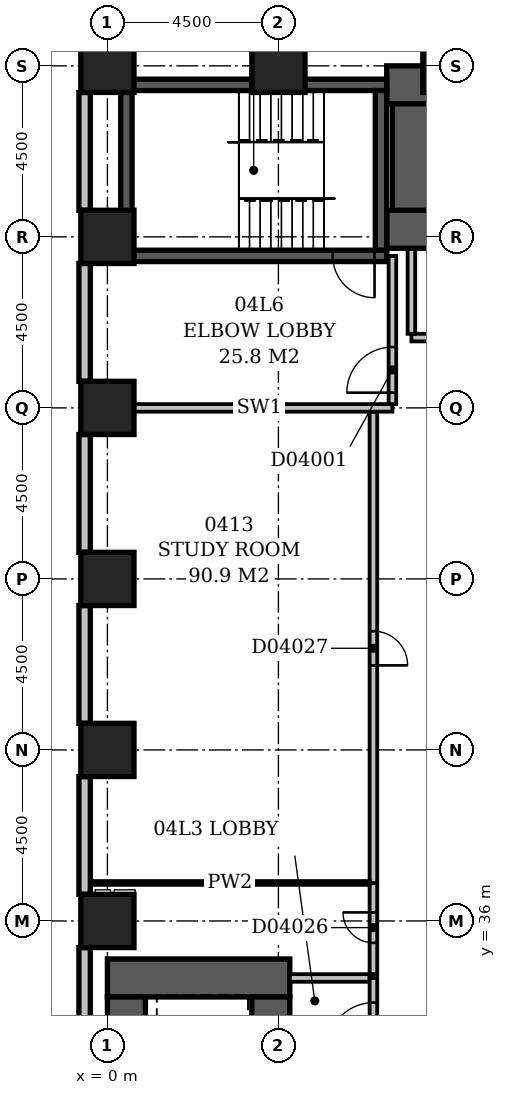
"""IFC4 building model, lengths in metres.
Left out: names, types, materials, properties, quantities, classifications, styles, units other than length and angle.
Written with IfcOpenShell. Run it as: python <this file> out.ifc"""

import sys

from ifc_helpers import new_model, si_unit, direction, frame, frame_2d, origin, origin_2d, place, context, subcontext, project, spatial, rectangle, extrude, element, fill, save


model = new_model("IFC4")
c1 = context("Model", 3, precision=1e-05, world=origin(), true_north=direction((0.0, 1.0)))
c2 = subcontext(c1, "Body", "Model", "MODEL_VIEW")
j1 = project(units=[si_unit("LENGTHUNIT", "METRE"), si_unit("PLANEANGLEUNIT", "RADIAN")], contexts=[c1])
p1 = place(None, origin())
s1 = spatial("IfcSite", under=j1, at=p1, CompositionType="ELEMENT")
p2 = place(p1, origin())
s2 = spatial("IfcBuilding", under=s1, at=p2, CompositionType="ELEMENT")
p3 = place(p2, frame((0.0, 0.0, 24.0)))
s3 = spatial("IfcBuildingStorey", under=s2, at=p3, CompositionType="ELEMENT", Elevation=24.0)
p4 = place(p3, frame((0.0, 34.5, -0.45), z_axis=(0.0, 0.0, 1.0), x_axis=(1.0, 0.0, 0.0)))
e1 = element("IfcWall", 1, at=p4, inside=s3, PredefinedType="SHEAR", context=c2, shape_type="SweptSolid", body=[
    extrude(rectangle(XDim=4.8, YDim=1.0, at=frame_2d((2.4, 0.0))), origin(), (0.0, 0.0, 1.0), 5.15),
])
p5 = place(p3, frame((0.35, 53.5, -0.45), z_axis=(0.0, 0.0, 1.0), x_axis=(1.0, 0.0, 0.0)))
e2 = element("IfcWall", 2, at=p5, inside=s3, PredefinedType="SHEAR", context=c2, shape_type="SweptSolid", body=[
    extrude(rectangle(XDim=7.0, YDim=0.3, at=frame_2d((3.5, 0.0))), origin(), (0.0, 0.0, 1.0), 5.15),
])
p6 = place(p5, frame((5.58, 0.0, 0.45)))
e3 = element("IfcOpeningElement", 3, at=p6, cuts=e2, PredefinedType="OPENING", context=c2, shape_type="SweptSolid", body=[
    extrude(rectangle(XDim=1.1, YDim=2.1, at=frame_2d((0.55, 1.05))), frame((0.0, 0.162, 0.0), z_axis=(0.0, -1.0, 0.0), x_axis=(1.0, 0.0, 0.0)), (0.0, 0.0, 1.0), 0.324),
])
p7 = place(p3, frame((0.35, 58.0, -0.45), z_axis=(0.0, 0.0, 1.0), x_axis=(1.0, 0.0, 0.0)))
e4 = element("IfcWall", 4, at=p7, inside=s3, PredefinedType="SHEAR", context=c2, shape_type="SweptSolid", body=[
    extrude(rectangle(XDim=7.0, YDim=0.3, at=frame_2d((3.5, 0.0))), origin(), (0.0, 0.0, 1.0), 5.15),
])
p8 = place(p3, frame((0.5, 27.15, -0.45), z_axis=(0.0, 0.0, 1.0), x_axis=(0.0, 1.0, 0.0)))
e5 = element("IfcWall", 5, at=p8, inside=s3, PredefinedType="SHEAR", context=c2, shape_type="SweptSolid", body=[
    extrude(rectangle(XDim=6.85, YDim=1.0, at=frame_2d((3.425, 0.0))), origin(), (0.0, 0.0, 1.0), 5.15),
])
p9 = place(p3, frame((0.5, 53.65, -0.45), z_axis=(0.0, 0.0, 1.0), x_axis=(0.0, 1.0, 0.0)))
e6 = element("IfcWall", 6, at=p9, inside=s3, PredefinedType="SHEAR", context=c2, shape_type="SweptSolid", body=[
    extrude(rectangle(XDim=4.2, YDim=0.3, at=frame_2d((2.1, 0.0))), origin(), (0.0, 0.0, 1.0), 5.15),
])
p10 = place(p3, frame((4.3, 27.15, -0.45), z_axis=(0.0, 0.0, 1.0), x_axis=(0.0, 1.0, 0.0)))
e7 = element("IfcWall", 7, at=p10, inside=s3, PredefinedType="SHEAR", context=c2, shape_type="SweptSolid", body=[
    extrude(rectangle(XDim=6.85, YDim=1.0, at=frame_2d((3.425, 0.0))), origin(), (0.0, 0.0, 1.0), 5.15),
])
p11 = place(p10, frame((3.05, 0.0, 0.45)))
e8 = element("IfcOpeningElement", 8, at=p11, cuts=e7, PredefinedType="OPENING", context=c2, shape_type="SweptSolid", body=[
    extrude(rectangle(XDim=1.1, YDim=2.1, at=frame_2d((0.55, 1.05))), frame((0.0, 0.512, 0.0), z_axis=(0.0, -1.0, 0.0), x_axis=(1.0, 0.0, 0.0)), (0.0, 0.0, 1.0), 1.024),
])
p12 = place(p10, frame((0.6, 0.0, 0.45)))
e9 = element("IfcOpeningElement", 9, at=p12, cuts=e7, PredefinedType="OPENING", context=c2, shape_type="SweptSolid", body=[
    extrude(rectangle(XDim=1.1, YDim=2.1, at=frame_2d((0.55, 1.05))), frame((0.0, 0.512, 0.0), z_axis=(0.0, -1.0, 0.0), x_axis=(1.0, 0.0, 0.0)), (0.0, 0.0, 1.0), 1.024),
])
p13 = place(p10, frame((5.15, 0.0, 0.45)))
e10 = element("IfcOpeningElement", 10, at=p13, cuts=e7, PredefinedType="OPENING", context=c2, shape_type="SweptSolid", body=[
    extrude(rectangle(XDim=1.1, YDim=2.1, at=frame_2d((0.55, 1.05))), frame((0.0, 0.512, 0.0), z_axis=(0.0, -1.0, 0.0), x_axis=(1.0, 0.0, 0.0)), (0.0, 0.0, 1.0), 1.024),
])
p14 = place(p3, frame((7.2, 53.65, -0.45), z_axis=(0.0, 0.0, 1.0), x_axis=(0.0, 1.0, 0.0)))
e11 = element("IfcWall", 11, at=p14, inside=s3, PredefinedType="SHEAR", context=c2, shape_type="SweptSolid", body=[
    extrude(rectangle(XDim=4.2, YDim=0.3, at=frame_2d((2.1, 0.0))), origin(), (0.0, 0.0, 1.0), 5.15),
])
p15 = place(p3, frame((7.35, 54.2, -0.45), z_axis=(0.0, 0.0, 1.0), x_axis=(1.0, 0.0, 0.0)))
e12 = element("IfcWall", 12, at=p15, inside=s3, PredefinedType="SHEAR", context=c2, shape_type="SweptSolid", body=[
    extrude(rectangle(XDim=16.35, YDim=1.0, at=frame_2d((8.175, 0.0))), origin(), (0.0, 0.0, 1.0), 5.15),
])
p16 = place(p15, frame((1.35, 0.0, 0.45)))
e13 = element("IfcOpeningElement", 13, at=p16, cuts=e12, PredefinedType="OPENING", context=c2, shape_type="SweptSolid", body=[
    extrude(rectangle(XDim=1.1, YDim=2.1, at=frame_2d((0.55, 1.05))), frame((0.0, 0.512, 0.0), z_axis=(0.0, -1.0, 0.0), x_axis=(1.0, 0.0, 0.0)), (0.0, 0.0, 1.0), 1.024),
])
p17 = place(p15, frame((3.85, 0.0, 0.45)))
e14 = element("IfcOpeningElement", 14, at=p17, cuts=e12, PredefinedType="OPENING", context=c2, shape_type="SweptSolid", body=[
    extrude(rectangle(XDim=1.1, YDim=2.1, at=frame_2d((0.55, 1.05))), frame((0.0, 0.512, 0.0), z_axis=(0.0, -1.0, 0.0), x_axis=(1.0, 0.0, 0.0)), (0.0, 0.0, 1.0), 1.024),
])
p18 = place(p15, frame((6.35, 0.0, 0.45)))
e15 = element("IfcOpeningElement", 15, at=p18, cuts=e12, PredefinedType="OPENING", context=c2, shape_type="SweptSolid", body=[
    extrude(rectangle(XDim=1.1, YDim=2.1, at=frame_2d((0.55, 1.05))), frame((0.0, 0.512, 0.0), z_axis=(0.0, -1.0, 0.0), x_axis=(1.0, 0.0, 0.0)), (0.0, 0.0, 1.0), 1.024),
])
p19 = place(p15, frame((8.85, 0.0, 0.45)))
e16 = element("IfcOpeningElement", 16, at=p19, cuts=e12, PredefinedType="OPENING", context=c2, shape_type="SweptSolid", body=[
    extrude(rectangle(XDim=1.1, YDim=2.1, at=frame_2d((0.55, 1.05))), frame((0.0, 0.512, 0.0), z_axis=(0.0, -1.0, 0.0), x_axis=(1.0, 0.0, 0.0)), (0.0, 0.0, 1.0), 1.024),
])
p20 = place(p15, frame((11.35, 0.0, 0.45)))
e17 = element("IfcOpeningElement", 17, at=p20, cuts=e12, PredefinedType="OPENING", context=c2, shape_type="SweptSolid", body=[
    extrude(rectangle(XDim=1.1, YDim=2.1, at=frame_2d((0.55, 1.05))), frame((0.0, 0.512, 0.0), z_axis=(0.0, -1.0, 0.0), x_axis=(1.0, 0.0, 0.0)), (0.0, 0.0, 1.0), 1.024),
])
p21 = place(p15, frame((13.85, 0.0, 0.45)))
e18 = element("IfcOpeningElement", 18, at=p21, cuts=e12, PredefinedType="OPENING", context=c2, shape_type="SweptSolid", body=[
    extrude(rectangle(XDim=1.1, YDim=2.1, at=frame_2d((0.55, 1.05))), frame((0.0, 0.512, 0.0), z_axis=(0.0, -1.0, 0.0), x_axis=(1.0, 0.0, 0.0)), (0.0, 0.0, 1.0), 1.024),
])
p22 = place(p3, frame((7.35, 58.0, -0.45), z_axis=(0.0, 0.0, 1.0), x_axis=(1.0, 0.0, 0.0)))
e19 = element("IfcWall", 19, at=p22, inside=s3, PredefinedType="SHEAR", context=c2, shape_type="SweptSolid", body=[
    extrude(rectangle(XDim=16.35, YDim=1.0, at=frame_2d((8.175, 0.0))), origin(), (0.0, 0.0, 1.0), 5.15),
])
p23 = place(p3, frame((8.0, 54.7, -0.45), z_axis=(0.0, 0.0, 1.0), x_axis=(0.0, 1.0, 0.0)))
e20 = element("IfcWall", 20, at=p23, inside=s3, PredefinedType="SHEAR", context=c2, shape_type="SweptSolid", body=[
    extrude(rectangle(XDim=2.8, YDim=1.0, at=frame_2d((1.4, 0.0))), origin(), (0.0, 0.0, 1.0), 5.15),
])
for number, where, z_axis, x_axis in (
    (21, (0.0, 36.0, -0.45), (0.0, 0.0, 1.0), (1.0, 0.0, 0.0)),
    (22, (0.0, 40.5, -0.45), (0.0, 0.0, 1.0), (1.0, 0.0, 0.0)),
    (23, (0.0, 45.0, -0.45), (0.0, 0.0, 1.0), (1.0, 0.0, 0.0)),
    (24, (0.0, 49.5, -0.45), (0.0, 0.0, 1.0), (1.0, 0.0, 0.0)),
    (25, (0.0, 54.0, -0.45), (0.0, 0.0, 1.0), (1.0, 0.0, 0.0)),
    (26, (0.0, 58.5, -0.45), (0.0, 0.0, 1.0), (1.0, 0.0, 0.0)),
    (27, (4.5, 58.5, -0.45), (0.0, 0.0, 1.0), (1.0, 0.0, 0.0)),
    (28, (9.0, 58.5, -0.45), (0.0, 0.0, 1.0), (1.0, 0.0, 0.0)),
):
    element("IfcColumn", number, at=place(p3, frame(where, z_axis=z_axis, x_axis=x_axis)), inside=s3, PredefinedType="COLUMN", context=c2, shape_type="SweptSolid", body=[
        extrude(rectangle(XDim=1.4, YDim=1.4, at=origin_2d()), origin(), (0.0, 0.0, 1.0), 5.15),
    ])
for number, where, z_axis, x_axis in (
    (29, (-0.6, 57.8, 0.0), (0.0, 0.0, 1.0), (0.0, -1.0, 0.0)),
    (30, (-0.6, 53.3, 0.0), (0.0, 0.0, 1.0), (0.0, -1.0, 0.0)),
    (31, (-0.6, 48.8, 0.0), (0.0, 0.0, 1.0), (0.0, -1.0, 0.0)),
    (32, (-0.6, 44.3, 0.0), (0.0, 0.0, 1.0), (0.0, -1.0, 0.0)),
    (33, (-0.6, 39.8, 0.0), (0.0, 0.0, 1.0), (0.0, -1.0, 0.0)),
    (34, (-0.6, 35.3, 0.0), (0.0, 0.0, 1.0), (0.0, -1.0, 0.0)),
):
    element("IfcWall", number, at=place(p3, frame(where, z_axis=z_axis, x_axis=x_axis)), inside=s3, PredefinedType="STANDARD", context=c2, shape_type="SweptSolid", body=[
        extrude(rectangle(XDim=3.1, YDim=0.3, at=frame_2d((1.55, 0.0))), origin(), (0.0, 0.0, 1.0), 4.1),
    ])
p24 = place(p3, frame((8.0, 51.35, 0.0), z_axis=(0.0, 0.0, 1.0), x_axis=(1.0, 0.0, 0.0)))
e35 = element("IfcWall", 35, at=p24, inside=s3, PredefinedType="PARTITIONING", context=c2, shape_type="SweptSolid", body=[
    extrude(rectangle(XDim=15.0, YDim=0.2, at=frame_2d((7.5, 0.0))), origin(), (0.0, 0.0, 1.0), 4.7),
])
p25 = place(p24, frame((3.4, 0.0, 0.0)))
e36 = element("IfcOpeningElement", 36, at=p25, cuts=e35, PredefinedType="OPENING", context=c2, shape_type="SweptSolid", body=[
    extrude(rectangle(XDim=1.2, YDim=2.1, at=frame_2d((0.6, 1.05))), frame((0.0, 0.112, 0.0), z_axis=(0.0, -1.0, 0.0), x_axis=(1.0, 0.0, 0.0)), (0.0, 0.0, 1.0), 0.224),
])
p26 = place(p24, frame((9.4, 0.0, 0.0)))
e37 = element("IfcOpeningElement", 37, at=p26, cuts=e35, PredefinedType="OPENING", context=c2, shape_type="SweptSolid", body=[
    extrude(rectangle(XDim=1.2, YDim=2.1, at=frame_2d((0.6, 1.05))), frame((0.0, 0.112, 0.0), z_axis=(0.0, -1.0, 0.0), x_axis=(1.0, 0.0, 0.0)), (0.0, 0.0, 1.0), 0.224),
])
p27 = place(p3, frame((8.0, 51.45, 0.0), z_axis=(0.0, 0.0, 1.0), x_axis=(0.0, 1.0, 0.0)))
e38 = element("IfcWall", 38, at=p27, inside=s3, PredefinedType="PARTITIONING", context=c2, shape_type="SweptSolid", body=[
    extrude(rectangle(XDim=2.23, YDim=0.2, at=frame_2d((1.115, 0.0))), origin(), (0.0, 0.0, 1.0), 4.7),
])
p28 = place(p3, frame((7.0, 32.1, 0.0), z_axis=(0.0, 0.0, 1.0), x_axis=(0.0, 1.0, 0.0)))
e39 = element("IfcWall", 39, at=p28, inside=s3, PredefinedType="PARTITIONING", context=c2, shape_type="SweptSolid", body=[
    extrude(rectangle(XDim=2.4, YDim=0.2, at=frame_2d((1.2, 0.0))), origin(), (0.0, 0.0, 1.0), 4.7),
])
p29 = place(p28, frame((0.55, 0.0, 0.0)))
e40 = element("IfcOpeningElement", 40, at=p29, cuts=e39, PredefinedType="OPENING", context=c2, shape_type="SweptSolid", body=[
    extrude(rectangle(XDim=1.2, YDim=2.1, at=frame_2d((0.6, 1.05))), frame((0.0, 0.112, 0.0), z_axis=(0.0, -1.0, 0.0), x_axis=(1.0, 0.0, 0.0)), (0.0, 0.0, 1.0), 0.224),
])
p30 = place(p3, frame((4.8, 34.5, 0.0), z_axis=(0.0, 0.0, 1.0), x_axis=(1.0, 0.0, 0.0)))
e41 = element("IfcWall", 41, at=p30, inside=s3, PredefinedType="PARTITIONING", context=c2, shape_type="SweptSolid", body=[
    extrude(rectangle(XDim=2.1, YDim=0.2, at=frame_2d((1.05, 0.0))), origin(), (0.0, 0.0, 1.0), 4.7),
])
p31 = place(p3, frame((0.5, 49.5, 0.0), z_axis=(0.0, 0.0, 1.0), x_axis=(1.0, 0.0, 0.0)))
e42 = element("IfcWall", 42, at=p31, inside=s3, PredefinedType="PARTITIONING", context=c2, shape_type="SweptSolid", body=[
    extrude(rectangle(XDim=7.0, YDim=0.2, at=frame_2d((3.5, 0.0))), origin(), (0.0, 0.0, 1.0), 4.7),
])
p32 = place(p3, frame((7.5, 49.6, 0.0), z_axis=(0.0, 0.0, 1.0), x_axis=(0.0, 1.0, 0.0)))
e43 = element("IfcWall", 43, at=p32, inside=s3, PredefinedType="PARTITIONING", context=c2, shape_type="SweptSolid", body=[
    extrude(rectangle(XDim=3.9, YDim=0.2, at=frame_2d((1.95, 0.0))), origin(), (0.0, 0.0, 1.0), 4.7),
])
p33 = place(p32, frame((0.3, 0.0, 0.0)))
e44 = element("IfcOpeningElement", 44, at=p33, cuts=e43, PredefinedType="OPENING", context=c2, shape_type="SweptSolid", body=[
    extrude(rectangle(XDim=1.2, YDim=2.1, at=frame_2d((0.6, 1.05))), frame((0.0, 0.112, 0.0), z_axis=(0.0, -1.0, 0.0), x_axis=(1.0, 0.0, 0.0)), (0.0, 0.0, 1.0), 0.224),
])
p34 = place(p3, frame((-0.45, 37.0, 0.0), z_axis=(0.0, 0.0, 1.0), x_axis=(1.0, 0.0, 0.0)))
e45 = element("IfcWall", 45, at=p34, inside=s3, PredefinedType="PARTITIONING", context=c2, shape_type="SweptSolid", body=[
    extrude(rectangle(XDim=7.35, YDim=0.1, at=frame_2d((3.675, 0.0))), origin(), (0.0, 0.0, 1.0), 4.7),
])
p35 = place(p3, frame((7.0, 37.0, 0.0), z_axis=(0.0, 0.0, 1.0), x_axis=(0.0, -1.0, 0.0)))
e46 = element("IfcWall", 46, at=p35, inside=s3, PredefinedType="PARTITIONING", context=c2, shape_type="SweptSolid", body=[
    extrude(rectangle(XDim=2.4, YDim=0.2, at=frame_2d((1.2, 0.0))), origin(), (0.0, 0.0, 1.0), 4.7),
])
p36 = place(p35, frame((0.775, 0.0, 0.0)))
e47 = element("IfcOpeningElement", 47, at=p36, cuts=e46, PredefinedType="OPENING", context=c2, shape_type="SweptSolid", body=[
    extrude(rectangle(XDim=0.8, YDim=2.1, at=frame_2d((0.4, 1.05))), frame((0.0, 0.112, 0.0), z_axis=(0.0, -1.0, 0.0), x_axis=(1.0, 0.0, 0.0)), (0.0, 0.0, 1.0), 0.224),
])
p37 = place(p3, frame((7.0, 49.4, 0.0), z_axis=(0.0, 0.0, 1.0), x_axis=(0.0, -1.0, 0.0)))
e48 = element("IfcWall", 48, at=p37, inside=s3, PredefinedType="PARTITIONING", context=c2, shape_type="SweptSolid", body=[
    extrude(rectangle(XDim=12.4, YDim=0.2, at=frame_2d((6.2, 0.0))), origin(), (0.0, 0.0, 1.0), 4.7),
])
p38 = place(p37, frame((5.775, 0.0, 0.0)))
e49 = element("IfcOpeningElement", 49, at=p38, cuts=e48, PredefinedType="OPENING", context=c2, shape_type="SweptSolid", body=[
    extrude(rectangle(XDim=0.9, YDim=2.1, at=frame_2d((0.45, 1.05))), frame((0.0, 0.112, 0.0), z_axis=(0.0, -1.0, 0.0), x_axis=(1.0, 0.0, 0.0)), (0.0, 0.0, 1.0), 0.224),
])
p39 = place(p33, origin())
e50 = element("IfcDoor", 50, at=p39, inside=s3, OperationType="SINGLE_SWING_LEFT", PredefinedType="DOOR", context=c2, shape_type="SweptSolid", body=[
    extrude(rectangle(XDim=1.2, YDim=2.1, at=frame_2d((0.6, 1.05))), frame((0.0, 0.025, 0.0), z_axis=(0.0, -1.0, 0.0), x_axis=(1.0, 0.0, 0.0)), (0.0, 0.0, 1.0), 0.05),
])
fill(e44, e50)
p40 = place(p29, origin())
e51 = element("IfcDoor", 51, at=p40, inside=s3, OperationType="SINGLE_SWING_LEFT", PredefinedType="DOOR", context=c2, shape_type="SweptSolid", body=[
    extrude(rectangle(XDim=1.2, YDim=2.1, at=frame_2d((0.6, 1.05))), frame((0.0, 0.025, 0.0), z_axis=(0.0, -1.0, 0.0), x_axis=(1.0, 0.0, 0.0)), (0.0, 0.0, 1.0), 0.05),
])
fill(e40, e51)
p41 = place(p6, origin())
e52 = element("IfcDoor", 52, at=p41, inside=s3, OperationType="SINGLE_SWING_RIGHT", PredefinedType="DOOR", context=c2, shape_type="SweptSolid", body=[
    extrude(rectangle(XDim=1.1, YDim=2.1, at=frame_2d((0.55, 1.05))), frame((0.0, 0.025, 0.0), z_axis=(0.0, -1.0, 0.0), x_axis=(1.0, 0.0, 0.0)), (0.0, 0.0, 1.0), 0.05),
])
fill(e3, e52)
p42 = place(p36, frame((0.8, 0.0, 0.0), z_axis=(0.0, 0.0, 1.0), x_axis=(-1.0, 0.0, 0.0)))
e53 = element("IfcDoor", 53, at=p42, inside=s3, OperationType="SINGLE_SWING_RIGHT", PredefinedType="DOOR", context=c2, shape_type="SweptSolid", body=[
    extrude(rectangle(XDim=0.8, YDim=2.1, at=frame_2d((0.4, 1.05))), frame((0.0, 0.025, 0.0), z_axis=(0.0, -1.0, 0.0), x_axis=(1.0, 0.0, 0.0)), (0.0, 0.0, 1.0), 0.05),
])
fill(e47, e53)
p43 = place(p38, frame((0.9, 0.0, 0.0), z_axis=(0.0, 0.0, 1.0), x_axis=(-1.0, 0.0, 0.0)))
e54 = element("IfcDoor", 54, at=p43, inside=s3, OperationType="SINGLE_SWING_LEFT", PredefinedType="DOOR", context=c2, shape_type="SweptSolid", body=[
    extrude(rectangle(XDim=0.9, YDim=2.1, at=frame_2d((0.45, 1.05))), frame((0.0, 0.025, 0.0), z_axis=(0.0, -1.0, 0.0), x_axis=(1.0, 0.0, 0.0)), (0.0, 0.0, 1.0), 0.05),
])
fill(e49, e54)
save(model, sys.argv[1])
